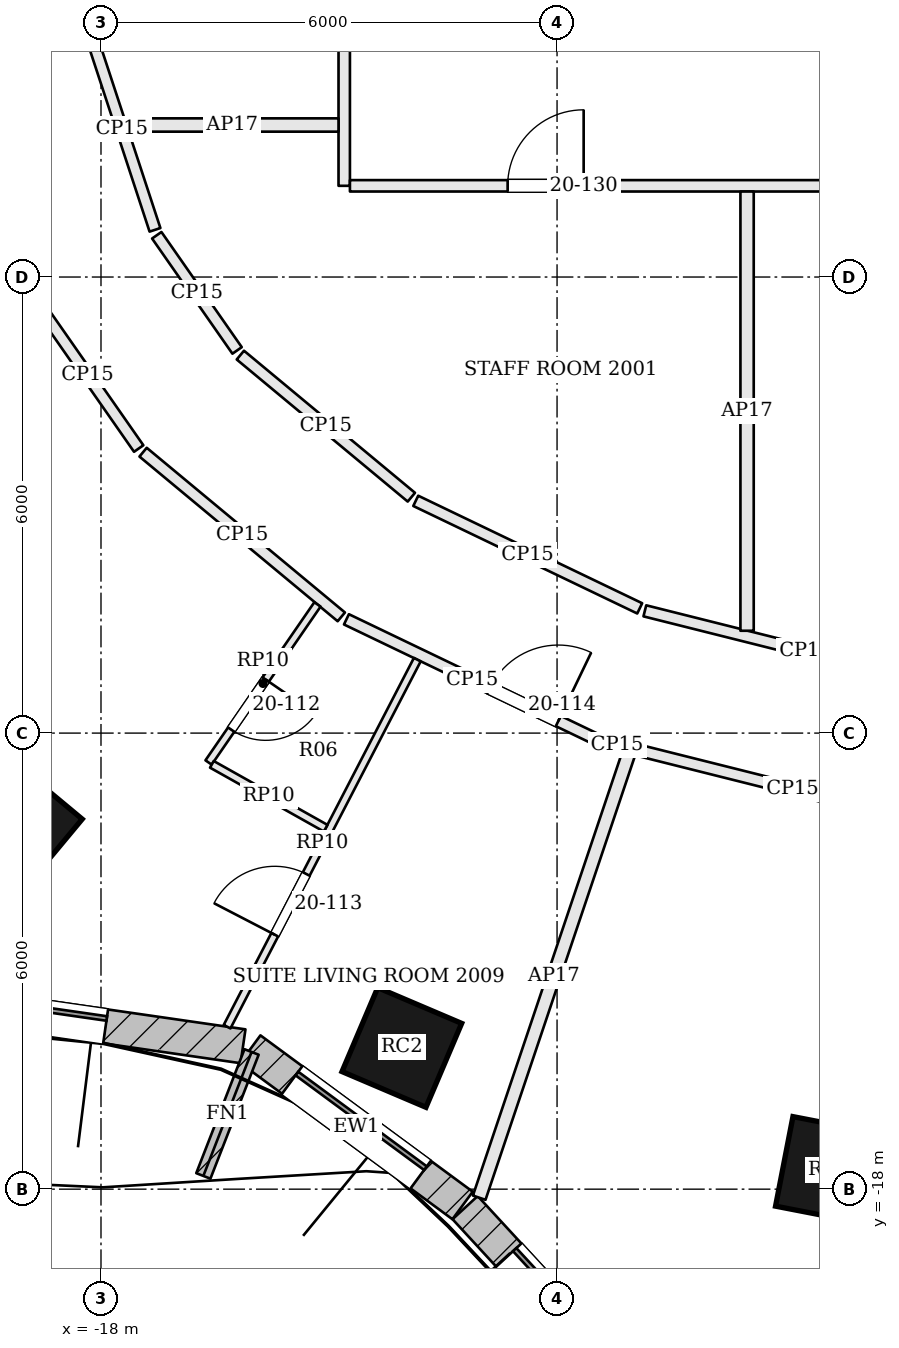
"""IFC4 building model, lengths in metres.
Left out: names, types, materials, properties, quantities, classifications, styles, units other than length and angle.
Written with IfcOpenShell. Run it as: python <this file> out.ifc"""

import sys

from ifc_helpers import new_model, si_unit, direction, frame, frame_2d, origin, origin_2d, place, context, subcontext, project, spatial, rectangle, extrude, element, fill, save


model = new_model("IFC4")
c1 = context("Model", 3, precision=1e-05, world=origin(), true_north=direction((0.0, 1.0)))
c2 = subcontext(c1, "Body", "Model", "MODEL_VIEW")
j1 = project(units=[si_unit("LENGTHUNIT", "METRE"), si_unit("PLANEANGLEUNIT", "RADIAN")], contexts=[c1])
p1 = place(None, origin())
s1 = spatial("IfcSite", under=j1, at=p1, CompositionType="ELEMENT")
p2 = place(p1, origin())
s2 = spatial("IfcBuilding", under=s1, at=p2, CompositionType="ELEMENT")
p3 = place(p2, frame((0.0, 0.0, 88.8)))
s3 = spatial("IfcBuildingStorey", under=s2, at=p3, CompositionType="ELEMENT", Elevation=88.8)
for number, where, z_axis, x_axis in (
    (1, (-19.092, -13.209, 0.0), (0.0, 0.0, 1.0), (0.769, -0.639, 0.0)),
    (2, (-14.042, -16.136, 0.0), (0.0, 0.0, 1.0), (0.92, -0.392, 0.0)),
    (3, (-8.422, -17.749, 0.0), (0.0, 0.0, 1.0), (0.982, -0.191, 0.0)),
):
    element("IfcColumn", number, at=place(p3, frame(where, z_axis=z_axis, x_axis=x_axis)), inside=s3, PredefinedType="COLUMN", context=c2, shape_type="SweptSolid", body=[
        extrude(rectangle(XDim=1.2, YDim=1.2, at=origin_2d()), origin(), (0.0, 0.0, 1.0), 3.6),
    ])
p4 = place(p3, frame((-21.825, -15.297, 0.0), z_axis=(0.0, 0.0, 1.0), x_axis=(0.98971474215, -0.143054986527, 0.0)))
e4 = element("IfcWall", 4, at=p4, inside=s3, PredefinedType="SOLIDWALL", context=c2, shape_type="SweptSolid", body=[
    extrude(rectangle(XDim=5.753, YDim=0.45, at=frame_2d((2.876, 0.0))), origin(), (0.0, 0.0, 1.0), 3.4),
])
p5 = place(p4, frame((1.826, 0.0, 0.9)))
e5 = element("IfcOpeningElement", 5, at=p5, cuts=e4, PredefinedType="OPENING", context=c2, shape_type="SweptSolid", body=[
    extrude(rectangle(XDim=2.1, YDim=2.0, at=frame_2d((1.05, 1.0))), frame((0.0, 0.235, 0.0), z_axis=(0.0, -1.0, 0.0), x_axis=(1.0, 0.0, 0.0)), (0.0, 0.0, 1.0), 0.47),
])
p6 = place(p3, frame((-16.036, -16.158, 0.0), z_axis=(0.0, 0.0, 1.0), x_axis=(0.805181432967, -0.593028549064, 0.0)))
e6 = element("IfcWall", 6, at=p6, inside=s3, PredefinedType="SOLIDWALL", context=c2, shape_type="SweptSolid", body=[
    extrude(rectangle(XDim=3.469, YDim=0.45, at=frame_2d((1.734, 0.0))), origin(), (0.0, 0.0, 1.0), 3.4),
])
p7 = place(p6, frame((0.684, 0.0, 0.9)))
e7 = element("IfcOpeningElement", 7, at=p7, cuts=e6, PredefinedType="OPENING", context=c2, shape_type="SweptSolid", body=[
    extrude(rectangle(XDim=2.1, YDim=2.0, at=frame_2d((1.05, 1.0))), frame((0.0, 0.235, 0.0), z_axis=(0.0, -1.0, 0.0), x_axis=(1.0, 0.0, 0.0)), (0.0, 0.0, 1.0), 0.47),
])
p8 = place(p3, frame((-13.209, -18.243, 0.0), z_axis=(0.0, 0.0, 1.0), x_axis=(0.677612152497, -0.735419452278, 0.0)))
e8 = element("IfcWall", 8, at=p8, inside=s3, PredefinedType="SOLIDWALL", context=c2, shape_type="SweptSolid", body=[
    extrude(rectangle(XDim=3.797, YDim=0.45, at=frame_2d((1.898, 0.0))), origin(), (0.0, 0.0, 1.0), 3.4),
])
p9 = place(p8, frame((0.848, 0.0, 0.9)))
e9 = element("IfcOpeningElement", 9, at=p9, cuts=e8, PredefinedType="OPENING", context=c2, shape_type="SweptSolid", body=[
    extrude(rectangle(XDim=2.1, YDim=2.0, at=frame_2d((1.05, 1.0))), frame((0.0, 0.235, 0.0), z_axis=(0.0, -1.0, 0.0), x_axis=(1.0, 0.0, 0.0)), (0.0, 0.0, 1.0), 0.47),
])
p10 = place(p3, frame((-16.019, -16.195, 0.0), z_axis=(0.0, 0.0, 1.0), x_axis=(-0.362641522028, -0.931928713208, 0.0)))
e10 = element("IfcWall", 10, at=p10, inside=s3, PredefinedType="SOLIDWALL", context=c2, shape_type="SweptSolid", body=[
    extrude(rectangle(XDim=1.75, YDim=0.2, at=frame_2d((0.875, 0.0))), origin(), (0.0, 0.0, 1.0), 3.4),
])
p11 = place(p3, frame((-18.851, -6.325, 0.0), z_axis=(0.0, 0.0, 1.0), x_axis=(0.572090775968, -0.820190309656, 0.0)))
e11 = element("IfcWall", 11, at=p11, inside=s3, PredefinedType="PARTITIONING", context=c2, shape_type="SweptSolid", body=[
    extrude(rectangle(XDim=2.355, YDim=0.15, at=frame_2d((1.177, 0.0))), origin(), (0.0, 0.0, 1.0), 2.784),
])
p12 = place(p3, frame((-17.446, -8.304, 0.0), z_axis=(0.0, 0.0, 1.0), x_axis=(0.769200174495, -0.639007896318, 0.0)))
e12 = element("IfcWall", 12, at=p12, inside=s3, PredefinedType="PARTITIONING", context=c2, shape_type="SweptSolid", body=[
    extrude(rectangle(XDim=3.39, YDim=0.15, at=frame_2d((1.695, 0.0))), origin(), (0.0, 0.0, 1.0), 2.784),
])
p13 = place(p3, frame((-14.771, -10.503, 0.0), z_axis=(0.0, 0.0, 1.0), x_axis=(0.901503349553, -0.432772123346, 0.0)))
e13 = element("IfcWall", 13, at=p13, inside=s3, PredefinedType="PARTITIONING", context=c2, shape_type="SweptSolid", body=[
    extrude(rectangle(XDim=3.673, YDim=0.15, at=frame_2d((1.836, 0.0))), origin(), (0.0, 0.0, 1.0), 2.784),
])
p14 = place(p13, frame((2.092, 0.0, 0.0)))
e14 = element("IfcOpeningElement", 14, at=p14, cuts=e13, PredefinedType="OPENING", context=c2, shape_type="SweptSolid", body=[
    extrude(rectangle(XDim=1.0, YDim=2.1, at=frame_2d((0.5, 1.05))), frame((0.0, 0.085, 0.0), z_axis=(0.0, -1.0, 0.0), x_axis=(1.0, 0.0, 0.0)), (0.0, 0.0, 1.0), 0.17),
])
p15 = place(p3, frame((-11.387, -12.111, 0.0), z_axis=(0.0, 0.0, 1.0), x_axis=(0.969945028314, -0.243324150157, 0.0)))
e15 = element("IfcWall", 15, at=p15, inside=s3, PredefinedType="PARTITIONING", context=c2, shape_type="SweptSolid", body=[
    extrude(rectangle(XDim=0.364, YDim=0.15, at=frame_2d((0.182, 0.0))), origin(), (0.0, 0.0, 1.0), 2.784),
])
p16 = place(p3, frame((-13.024, -18.112, 0.0), z_axis=(0.0, 0.0, 1.0), x_axis=(0.319078434674, 0.947728311556, 0.0)))
e16 = element("IfcWall", 16, at=p16, inside=s3, PredefinedType="PARTITIONING", context=c2, shape_type="SweptSolid", body=[
    extrude(rectangle(XDim=6.163, YDim=0.175, at=frame_2d((3.082, 0.0))), origin(), (0.0, 0.0, 1.0), 2.784),
])
p17 = place(p3, frame((-10.961, -12.218, 0.0), z_axis=(0.0, 0.0, 1.0), x_axis=(0.969990045386, -0.243144631551, 0.0)))
e17 = element("IfcWall", 17, at=p17, inside=s3, PredefinedType="PARTITIONING", context=c2, shape_type="SweptSolid", body=[
    extrude(rectangle(XDim=4.244, YDim=0.15, at=frame_2d((2.122, 0.0))), origin(), (0.0, 0.0, 1.0), 2.784),
])
p18 = place(p3, frame((-6.617, -11.451, 0.0), z_axis=(0.0, 0.0, 1.0), x_axis=(-0.969987441267, 0.243155020069, 0.0)))
e18 = element("IfcWall", 18, at=p18, inside=s3, PredefinedType="PARTITIONING", context=c2, shape_type="SweptSolid", body=[
    extrude(rectangle(XDim=4.359, YDim=0.15, at=frame_2d((2.179, 0.0))), origin(), (0.0, 0.0, 1.0), 2.784),
])
p19 = place(p3, frame((-10.913, -10.359, 0.0), z_axis=(0.0, 0.0, 1.0), x_axis=(-0.90149741277, 0.432784489982, 0.0)))
e19 = element("IfcWall", 19, at=p19, inside=s3, PredefinedType="PARTITIONING", context=c2, shape_type="SweptSolid", body=[
    extrude(rectangle(XDim=3.269, YDim=0.15, at=frame_2d((1.634, 0.0))), origin(), (0.0, 0.0, 1.0), 2.784),
])
p20 = place(p3, frame((-13.917, -8.896, 0.0), z_axis=(0.0, 0.0, 1.0), x_axis=(-0.769130409479, 0.639091866021, 0.0)))
e20 = element("IfcWall", 20, at=p20, inside=s3, PredefinedType="PARTITIONING", context=c2, shape_type="SweptSolid", body=[
    extrude(rectangle(XDim=2.925, YDim=0.15, at=frame_2d((1.462, 0.0))), origin(), (0.0, 0.0, 1.0), 2.784),
])
p21 = place(p3, frame((-16.209, -6.966, 0.0), z_axis=(0.0, 0.0, 1.0), x_axis=(-0.572051367607, 0.820217795966, 0.0)))
e21 = element("IfcWall", 21, at=p21, inside=s3, PredefinedType="PARTITIONING", context=c2, shape_type="SweptSolid", body=[
    extrude(rectangle(XDim=1.848, YDim=0.15, at=frame_2d((0.924, 0.0))), origin(), (0.0, 0.0, 1.0), 2.784),
])
p22 = place(p3, frame((-17.29, -5.379, 0.0), z_axis=(0.0, 0.0, 1.0), x_axis=(-0.312009486843, 0.950078986253, 0.0)))
e22 = element("IfcWall", 22, at=p22, inside=s3, PredefinedType="PARTITIONING", context=c2, shape_type="SweptSolid", body=[
    extrude(rectangle(XDim=2.78, YDim=0.15, at=frame_2d((1.39, 0.0))), origin(), (0.0, 0.0, 1.0), 2.784),
])
p23 = place(p3, frame((-14.8, 8.148, 0.0), z_axis=(0.0, 0.0, 1.0), x_axis=(0.0, -1.0, 0.0)))
e23 = element("IfcWall", 23, at=p23, inside=s3, PredefinedType="PARTITIONING", context=c2, shape_type="SweptSolid", body=[
    extrude(rectangle(XDim=12.948, YDim=0.15, at=frame_2d((6.474, 0.0))), origin(), (0.0, 0.0, 1.0), 2.784),
])
p24 = place(p23, frame((5.687, 0.0, 0.0)))
e24 = element("IfcOpeningElement", 24, at=p24, cuts=e23, PredefinedType="OPENING", context=c2, shape_type="SweptSolid", body=[
    extrude(rectangle(XDim=0.7, YDim=2.1, at=frame_2d((0.35, 1.05))), frame((0.0, 0.085, 0.0), z_axis=(0.0, -1.0, 0.0), x_axis=(1.0, 0.0, 0.0)), (0.0, 0.0, 1.0), 0.17),
])
p25 = place(p3, frame((-14.725, -4.8, 0.0), z_axis=(0.0, 0.0, 1.0), x_axis=(1.0, 0.0, 0.0)))
e25 = element("IfcWall", 25, at=p25, inside=s3, PredefinedType="PARTITIONING", context=c2, shape_type="SweptSolid", body=[
    extrude(rectangle(XDim=29.525, YDim=0.15, at=frame_2d((14.763, 0.0))), origin(), (0.0, 0.0, 1.0), 2.784),
])
p26 = place(p25, frame((2.075, 0.0, 0.0)))
e26 = element("IfcOpeningElement", 26, at=p26, cuts=e25, PredefinedType="OPENING", context=c2, shape_type="SweptSolid", body=[
    extrude(rectangle(XDim=1.0, YDim=2.1, at=frame_2d((0.5, 1.05))), frame((0.0, 0.085, 0.0), z_axis=(0.0, -1.0, 0.0), x_axis=(1.0, 0.0, 0.0)), (0.0, 0.0, 1.0), 0.17),
])
p27 = place(p25, frame((13.825, 0.0, 0.0)))
e27 = element("IfcOpeningElement", 27, at=p27, cuts=e25, PredefinedType="OPENING", context=c2, shape_type="SweptSolid", body=[
    extrude(rectangle(XDim=1.8, YDim=2.1, at=frame_2d((0.9, 1.05))), frame((0.0, 0.085, 0.0), z_axis=(0.0, -1.0, 0.0), x_axis=(1.0, 0.0, 0.0)), (0.0, 0.0, 1.0), 0.17),
])
p28 = place(p25, frame((26.525, 0.0, 0.0)))
e28 = element("IfcOpeningElement", 28, at=p28, cuts=e25, PredefinedType="OPENING", context=c2, shape_type="SweptSolid", body=[
    extrude(rectangle(XDim=0.7, YDim=2.1, at=frame_2d((0.35, 1.05))), frame((0.0, 0.085, 0.0), z_axis=(0.0, -1.0, 0.0), x_axis=(1.0, 0.0, 0.0)), (0.0, 0.0, 1.0), 0.17),
])
p29 = place(p3, frame((-16.341, -15.862, 0.0), z_axis=(0.0, 0.0, 1.0), x_axis=(0.460149427678, 0.887841485969, 0.0)))
e29 = element("IfcWall", 29, at=p29, inside=s3, PredefinedType="PARTITIONING", context=c2, shape_type="SweptSolid", body=[
    extrude(rectangle(XDim=5.438, YDim=0.1, at=frame_2d((2.719, 0.0))), origin(), (0.0, 0.0, 1.0), 2.884),
])
p30 = place(p29, frame((1.363, 0.0, 0.0)))
e30 = element("IfcOpeningElement", 30, at=p30, cuts=e29, PredefinedType="OPENING", context=c2, shape_type="SweptSolid", body=[
    extrude(rectangle(XDim=0.9, YDim=2.4, at=frame_2d((0.45, 1.2))), frame((0.0, 0.06, 0.0), z_axis=(0.0, -1.0, 0.0), x_axis=(1.0, 0.0, 0.0)), (0.0, 0.0, 1.0), 0.12),
])
p31 = place(p3, frame((-15.152, -10.307, 0.0), z_axis=(0.0, 0.0, 1.0), x_axis=(-0.567242581317, -0.823550759784, 0.0)))
e31 = element("IfcWall", 31, at=p31, inside=s3, PredefinedType="PARTITIONING", context=c2, shape_type="SweptSolid", body=[
    extrude(rectangle(XDim=2.525, YDim=0.1, at=frame_2d((1.263, 0.0))), origin(), (0.0, 0.0, 1.0), 2.884),
])
p32 = place(p31, frame((1.2, 0.0, 0.0)))
e32 = element("IfcOpeningElement", 32, at=p32, cuts=e31, PredefinedType="OPENING", context=c2, shape_type="SweptSolid", body=[
    extrude(rectangle(XDim=0.8, YDim=2.1, at=frame_2d((0.4, 1.05))), frame((0.0, 0.06, 0.0), z_axis=(0.0, -1.0, 0.0), x_axis=(1.0, 0.0, 0.0)), (0.0, 0.0, 1.0), 0.12),
])
p33 = place(p3, frame((-16.541, -12.411, 0.0), z_axis=(0.0, 0.0, 1.0), x_axis=(0.872042364088, -0.489430398765, 0.0)))
e33 = element("IfcWall", 33, at=p33, inside=s3, PredefinedType="PARTITIONING", context=c2, shape_type="SweptSolid", body=[
    extrude(rectangle(XDim=1.717, YDim=0.1, at=frame_2d((0.858, 0.0))), origin(), (0.0, 0.0, 1.0), 2.884),
])
p34 = place(p3, frame((-9.5, -10.654, 0.0), z_axis=(0.0, 0.0, 1.0), x_axis=(0.0, 1.0, 0.0)))
e34 = element("IfcWall", 34, at=p34, inside=s3, PredefinedType="PARTITIONING", context=c2, shape_type="SweptSolid", body=[
    extrude(rectangle(XDim=5.779, YDim=0.175, at=frame_2d((2.889, 0.0))), origin(), (0.0, 0.0, 1.0), 2.784),
])
p35 = place(p3, frame((-17.668, -4.0, 0.0), z_axis=(0.0, 0.0, 1.0), x_axis=(1.0, 0.0, 0.0)))
e35 = element("IfcWall", 35, at=p35, inside=s3, PredefinedType="PARTITIONING", context=c2, shape_type="SweptSolid", body=[
    extrude(rectangle(XDim=2.793, YDim=0.175, at=frame_2d((1.396, 0.0))), origin(), (0.0, 0.0, 1.0), 2.784),
])
p36 = place(p5, origin())
e36 = element("IfcWindow", 36, at=p36, inside=s3, PartitioningType="SINGLE_PANEL", PredefinedType="WINDOW", context=c2, shape_type="SweptSolid", body=[
    extrude(rectangle(XDim=2.1, YDim=2.0, at=frame_2d((1.05, 1.0))), frame((0.0, 0.135, 0.0), z_axis=(0.0, -1.0, 0.0), x_axis=(1.0, 0.0, 0.0)), (0.0, 0.0, 1.0), 0.06),
])
fill(e5, e36)
p37 = place(p7, origin())
e37 = element("IfcWindow", 37, at=p37, inside=s3, PartitioningType="SINGLE_PANEL", PredefinedType="WINDOW", context=c2, shape_type="SweptSolid", body=[
    extrude(rectangle(XDim=2.1, YDim=2.0, at=frame_2d((1.05, 1.0))), frame((0.0, 0.135, 0.0), z_axis=(0.0, -1.0, 0.0), x_axis=(1.0, 0.0, 0.0)), (0.0, 0.0, 1.0), 0.06),
])
fill(e7, e37)
p38 = place(p9, origin())
e38 = element("IfcWindow", 38, at=p38, inside=s3, PartitioningType="SINGLE_PANEL", PredefinedType="WINDOW", context=c2, shape_type="SweptSolid", body=[
    extrude(rectangle(XDim=2.1, YDim=2.0, at=frame_2d((1.05, 1.0))), frame((0.0, 0.135, 0.0), z_axis=(0.0, -1.0, 0.0), x_axis=(1.0, 0.0, 0.0)), (0.0, 0.0, 1.0), 0.06),
])
fill(e9, e38)
p39 = place(p32, origin())
e39 = element("IfcDoor", 39, at=p39, inside=s3, OperationType="SINGLE_SWING_LEFT", PredefinedType="DOOR", context=c2, shape_type="SweptSolid", body=[
    extrude(rectangle(XDim=0.8, YDim=2.1, at=frame_2d((0.4, 1.05))), frame((0.0, 0.025, 0.0), z_axis=(0.0, -1.0, 0.0), x_axis=(1.0, 0.0, 0.0)), (0.0, 0.0, 1.0), 0.05),
])
fill(e32, e39)
p40 = place(p30, origin())
e40 = element("IfcDoor", 40, at=p40, inside=s3, OperationType="SINGLE_SWING_LEFT", PredefinedType="DOOR", context=c2, shape_type="SweptSolid", body=[
    extrude(rectangle(XDim=0.9, YDim=2.4, at=frame_2d((0.45, 1.2))), frame((0.0, 0.025, 0.0), z_axis=(0.0, -1.0, 0.0), x_axis=(1.0, 0.0, 0.0)), (0.0, 0.0, 1.0), 0.05),
])
fill(e30, e40)
p41 = place(p14, origin())
e41 = element("IfcDoor", 41, at=p41, inside=s3, OperationType="SINGLE_SWING_RIGHT", PredefinedType="DOOR", context=c2, shape_type="SweptSolid", body=[
    extrude(rectangle(XDim=1.0, YDim=2.1, at=frame_2d((0.5, 1.05))), frame((0.0, 0.025, 0.0), z_axis=(0.0, -1.0, 0.0), x_axis=(1.0, 0.0, 0.0)), (0.0, 0.0, 1.0), 0.05),
])
fill(e14, e41)
p42 = place(p26, origin())
e42 = element("IfcDoor", 42, at=p42, inside=s3, OperationType="SINGLE_SWING_RIGHT", PredefinedType="DOOR", context=c2, shape_type="SweptSolid", body=[
    extrude(rectangle(XDim=1.0, YDim=2.1, at=frame_2d((0.5, 1.05))), frame((0.0, 0.025, 0.0), z_axis=(0.0, -1.0, 0.0), x_axis=(1.0, 0.0, 0.0)), (0.0, 0.0, 1.0), 0.05),
])
fill(e26, e42)
save(model, sys.argv[1])
